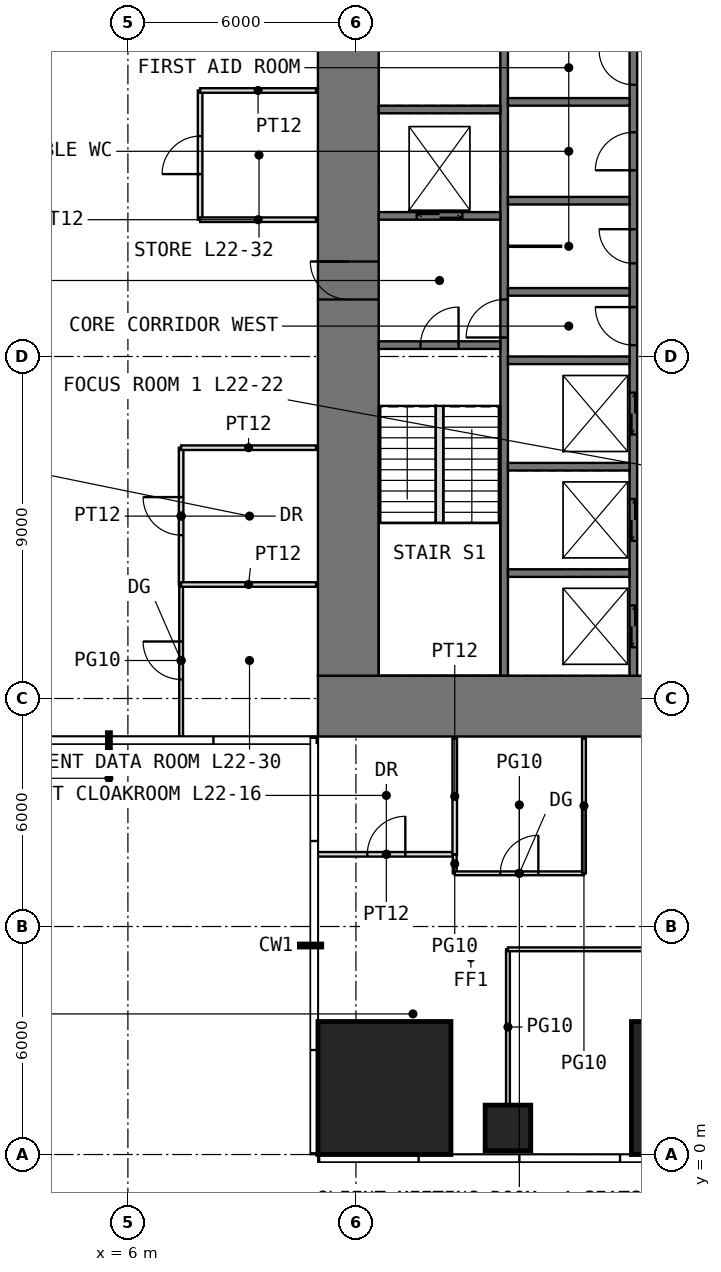
"""IFC4 building model, lengths in metres.
Left out: names, types, materials, properties, quantities, classifications, styles, units other than length and angle.
Written with IfcOpenShell. Run it as: python <this file> out.ifc"""

import sys

from ifc_helpers import new_model, si_unit, direction, frame, frame_2d, origin, origin_2d, place, context, subcontext, project, spatial, rectangle, extrude, element, fill, save


model = new_model("IFC4")
c1 = context("Model", 3, precision=1e-05, world=origin(), true_north=direction((0.0, 1.0)))
c2 = subcontext(c1, "Body", "Model", "MODEL_VIEW")
j1 = project(units=[si_unit("LENGTHUNIT", "METRE"), si_unit("PLANEANGLEUNIT", "RADIAN")], contexts=[c1])
p1 = place(None, origin())
s1 = spatial("IfcSite", under=j1, at=p1, CompositionType="ELEMENT")
p2 = place(p1, origin())
s2 = spatial("IfcBuilding", under=s1, at=p2, CompositionType="ELEMENT")
p3 = place(p2, frame((0.0, 0.0, 96.5)))
s3 = spatial("IfcBuildingStorey", under=s2, at=p3, CompositionType="ELEMENT", Elevation=96.5)
p4 = place(p3, frame((12.75, 1.75, 0.0), z_axis=(0.0, 0.0, 1.0), x_axis=(1.0, 0.0, 0.0)))
e1 = element("IfcColumn", 1, at=p4, inside=s3, PredefinedType="COLUMN", context=c2, shape_type="SweptSolid", body=[
    extrude(rectangle(XDim=3.5, YDim=3.5, at=origin_2d()), origin(), (0.0, 0.0, 1.0), 4.0),
])
p5 = place(p3, frame((16.0, 0.7, 0.0), z_axis=(0.0, 0.0, 1.0), x_axis=(1.0, 0.0, 0.0)))
e2 = element("IfcColumn", 2, at=p5, inside=s3, PredefinedType="COLUMN", context=c2, shape_type="SweptSolid", body=[
    extrude(rectangle(XDim=1.2, YDim=1.2, at=origin_2d()), origin(), (0.0, 0.0, 1.0), 4.0),
])
p6 = place(p3, frame((21.0, 1.75, 0.0), z_axis=(0.0, 0.0, 1.0), x_axis=(1.0, 0.0, 0.0)))
e3 = element("IfcColumn", 3, at=p6, inside=s3, PredefinedType="COLUMN", context=c2, shape_type="SweptSolid", body=[
    extrude(rectangle(XDim=3.5, YDim=3.5, at=origin_2d()), origin(), (0.0, 0.0, 1.0), 4.0),
])
p7 = place(p3, frame((11.0, 11.8, -0.05), z_axis=(0.0, 0.0, 1.0), x_axis=(1.0, 0.0, 0.0)))
e4 = element("IfcWall", 4, at=p7, inside=s3, PredefinedType="SHEAR", context=c2, shape_type="SweptSolid", body=[
    extrude(rectangle(XDim=20.0, YDim=1.6, at=frame_2d((10.0, 0.0))), origin(), (0.0, 0.0, 1.0), 4.0),
])
p8 = place(p7, frame((9.0, 0.0, 0.05)))
e5 = element("IfcOpeningElement", 5, at=p8, cuts=e4, PredefinedType="OPENING", context=c2, shape_type="SweptSolid", body=[
    extrude(rectangle(XDim=2.0, YDim=2.2, at=frame_2d((1.0, 1.1))), frame((0.0, 0.81, 0.0), z_axis=(0.0, -1.0, 0.0), x_axis=(1.0, 0.0, 0.0)), (0.0, 0.0, 1.0), 1.62),
])
p9 = place(p3, frame((11.8, 12.6, -0.05), z_axis=(0.0, 0.0, 1.0), x_axis=(0.0, 1.0, 0.0)))
e6 = element("IfcWall", 6, at=p9, inside=s3, PredefinedType="SHEAR", context=c2, shape_type="SweptSolid", body=[
    extrude(rectangle(XDim=16.8, YDim=1.6, at=frame_2d((8.4, 0.0))), origin(), (0.0, 0.0, 1.0), 4.0),
])
p10 = place(p9, frame((9.9, 0.0, 0.05)))
e7 = element("IfcOpeningElement", 7, at=p10, cuts=e6, PredefinedType="OPENING", context=c2, shape_type="SweptSolid", body=[
    extrude(rectangle(XDim=1.0, YDim=2.2, at=frame_2d((0.5, 1.1))), frame((0.0, 0.81, 0.0), z_axis=(0.0, -1.0, 0.0), x_axis=(1.0, 0.0, 0.0)), (0.0, 0.0, 1.0), 1.62),
])
p11 = place(p3, frame((15.9, 12.6, -0.05), z_axis=(0.0, 0.0, 1.0), x_axis=(0.0, 1.0, 0.0)))
e8 = element("IfcWall", 8, at=p11, inside=s3, PredefinedType="SHEAR", context=c2, shape_type="SweptSolid", body=[
    extrude(rectangle(XDim=16.8, YDim=0.2, at=frame_2d((8.4, 0.0))), origin(), (0.0, 0.0, 1.0), 4.0),
])
p12 = place(p11, frame((8.9, 0.0, 0.05)))
e9 = element("IfcOpeningElement", 9, at=p12, cuts=e8, PredefinedType="OPENING", context=c2, shape_type="SweptSolid", body=[
    extrude(rectangle(XDim=1.0, YDim=2.2, at=frame_2d((0.5, 1.1))), frame((0.0, 0.11, 0.0), z_axis=(0.0, -1.0, 0.0), x_axis=(1.0, 0.0, 0.0)), (0.0, 0.0, 1.0), 0.22),
])
p13 = place(p3, frame((19.3, 12.6, -0.05), z_axis=(0.0, 0.0, 1.0), x_axis=(0.0, 1.0, 0.0)))
e10 = element("IfcWall", 10, at=p13, inside=s3, PredefinedType="SHEAR", context=c2, shape_type="SweptSolid", body=[
    extrude(rectangle(XDim=16.8, YDim=0.2, at=frame_2d((8.4, 0.0))), origin(), (0.0, 0.0, 1.0), 4.0),
])
p14 = place(p13, frame((8.7, 0.0, 0.05)))
e11 = element("IfcOpeningElement", 11, at=p14, cuts=e10, PredefinedType="OPENING", context=c2, shape_type="SweptSolid", body=[
    extrude(rectangle(XDim=1.0, YDim=2.2, at=frame_2d((0.5, 1.1))), frame((0.0, 0.11, 0.0), z_axis=(0.0, -1.0, 0.0), x_axis=(1.0, 0.0, 0.0)), (0.0, 0.0, 1.0), 0.22),
])
p15 = place(p13, frame((10.85, 0.0, 0.05)))
e12 = element("IfcOpeningElement", 12, at=p15, cuts=e10, PredefinedType="OPENING", context=c2, shape_type="SweptSolid", body=[
    extrude(rectangle(XDim=0.9, YDim=2.2, at=frame_2d((0.45, 1.1))), frame((0.0, 0.11, 0.0), z_axis=(0.0, -1.0, 0.0), x_axis=(1.0, 0.0, 0.0)), (0.0, 0.0, 1.0), 0.22),
])
p16 = place(p13, frame((13.3, 0.0, 0.05)))
e13 = element("IfcOpeningElement", 13, at=p16, cuts=e10, PredefinedType="OPENING", context=c2, shape_type="SweptSolid", body=[
    extrude(rectangle(XDim=1.0, YDim=2.2, at=frame_2d((0.5, 1.1))), frame((0.0, 0.11, 0.0), z_axis=(0.0, -1.0, 0.0), x_axis=(1.0, 0.0, 0.0)), (0.0, 0.0, 1.0), 0.22),
])
p17 = place(p13, frame((15.55, 0.0, 0.05)))
e14 = element("IfcOpeningElement", 14, at=p17, cuts=e10, PredefinedType="OPENING", context=c2, shape_type="SweptSolid", body=[
    extrude(rectangle(XDim=0.9, YDim=2.2, at=frame_2d((0.45, 1.1))), frame((0.0, 0.11, 0.0), z_axis=(0.0, -1.0, 0.0), x_axis=(1.0, 0.0, 0.0)), (0.0, 0.0, 1.0), 0.22),
])
p18 = place(p13, frame((0.75, 0.0, 0.05)))
e15 = element("IfcOpeningElement", 15, at=p18, cuts=e10, PredefinedType="OPENING", context=c2, shape_type="SweptSolid", body=[
    extrude(rectangle(XDim=1.1, YDim=2.2, at=frame_2d((0.55, 1.1))), frame((0.0, 0.11, 0.0), z_axis=(0.0, -1.0, 0.0), x_axis=(1.0, 0.0, 0.0)), (0.0, 0.0, 1.0), 0.22),
])
p19 = place(p13, frame((3.55, 0.0, 0.05)))
e16 = element("IfcOpeningElement", 16, at=p19, cuts=e10, PredefinedType="OPENING", context=c2, shape_type="SweptSolid", body=[
    extrude(rectangle(XDim=1.1, YDim=2.2, at=frame_2d((0.55, 1.1))), frame((0.0, 0.11, 0.0), z_axis=(0.0, -1.0, 0.0), x_axis=(1.0, 0.0, 0.0)), (0.0, 0.0, 1.0), 0.22),
])
p20 = place(p13, frame((6.35, 0.0, 0.05)))
e17 = element("IfcOpeningElement", 17, at=p20, cuts=e10, PredefinedType="OPENING", context=c2, shape_type="SweptSolid", body=[
    extrude(rectangle(XDim=1.1, YDim=2.2, at=frame_2d((0.55, 1.1))), frame((0.0, 0.11, 0.0), z_axis=(0.0, -1.0, 0.0), x_axis=(1.0, 0.0, 0.0)), (0.0, 0.0, 1.0), 0.22),
])
p21 = place(p3, frame((12.6, 21.3, -0.05), z_axis=(0.0, 0.0, 1.0), x_axis=(1.0, 0.0, 0.0)))
e18 = element("IfcWall", 18, at=p21, inside=s3, PredefinedType="SHEAR", context=c2, shape_type="SweptSolid", body=[
    extrude(rectangle(XDim=3.2, YDim=0.2, at=frame_2d((1.6, 0.0))), origin(), (0.0, 0.0, 1.0), 4.0),
])
p22 = place(p21, frame((1.1, 0.0, 0.05)))
e19 = element("IfcOpeningElement", 19, at=p22, cuts=e18, PredefinedType="OPENING", context=c2, shape_type="SweptSolid", body=[
    extrude(rectangle(XDim=1.0, YDim=2.2, at=frame_2d((0.5, 1.1))), frame((0.0, 0.11, 0.0), z_axis=(0.0, -1.0, 0.0), x_axis=(1.0, 0.0, 0.0)), (0.0, 0.0, 1.0), 0.22),
])
p23 = place(p3, frame((12.6, 24.7, -0.05), z_axis=(0.0, 0.0, 1.0), x_axis=(1.0, 0.0, 0.0)))
e20 = element("IfcWall", 20, at=p23, inside=s3, PredefinedType="SHEAR", context=c2, shape_type="SweptSolid", body=[
    extrude(rectangle(XDim=3.2, YDim=0.2, at=frame_2d((1.6, 0.0))), origin(), (0.0, 0.0, 1.0), 4.0),
])
p24 = place(p23, frame((1.0, 0.0, 0.05)))
e21 = element("IfcOpeningElement", 21, at=p24, cuts=e20, PredefinedType="OPENING", context=c2, shape_type="SweptSolid", body=[
    extrude(rectangle(XDim=1.2, YDim=2.2, at=frame_2d((0.6, 1.1))), frame((0.0, 0.11, 0.0), z_axis=(0.0, -1.0, 0.0), x_axis=(1.0, 0.0, 0.0)), (0.0, 0.0, 1.0), 0.22),
])
for number, where, z_axis, x_axis in (
    (22, (12.6, 27.5, -0.05), (0.0, 0.0, 1.0), (1.0, 0.0, 0.0)),
    (23, (16.0, 15.3, -0.05), (0.0, 0.0, 1.0), (1.0, 0.0, 0.0)),
    (24, (16.0, 18.1, -0.05), (0.0, 0.0, 1.0), (1.0, 0.0, 0.0)),
    (25, (16.0, 20.9, -0.05), (0.0, 0.0, 1.0), (1.0, 0.0, 0.0)),
    (26, (16.0, 22.7, -0.05), (0.0, 0.0, 1.0), (1.0, 0.0, 0.0)),
    (27, (16.0, 25.1, -0.05), (0.0, 0.0, 1.0), (1.0, 0.0, 0.0)),
    (28, (16.0, 27.7, -0.05), (0.0, 0.0, 1.0), (1.0, 0.0, 0.0)),
):
    element("IfcWall", number, at=place(p3, frame(where, z_axis=z_axis, x_axis=x_axis)), inside=s3, PredefinedType="SHEAR", context=c2, shape_type="SweptSolid", body=[
        extrude(rectangle(XDim=3.2, YDim=0.2, at=frame_2d((1.6, 0.0))), origin(), (0.0, 0.0, 1.0), 4.0),
    ])
p25 = place(p3, frame((16.0, 23.9, 0.0), z_axis=(0.0, 0.0, 1.0), x_axis=(1.0, 0.0, 0.0)))
e29 = element("IfcWall", 29, at=p25, inside=s3, PredefinedType="PARTITIONING", context=c2, shape_type="SweptSolid", body=[
    extrude(rectangle(XDim=1.4, YDim=0.03, at=frame_2d((0.7, 0.0))), origin(), (0.0, 0.0, 1.0), 3.75),
])
p26 = place(p3, frame((7.4, 11.0, 0.0), z_axis=(0.0, 0.0, 1.0), x_axis=(0.0, 1.0, 0.0)))
e30 = element("IfcWall", 30, at=p26, inside=s3, PredefinedType="PARTITIONING", context=c2, shape_type="SweptSolid", body=[
    extrude(rectangle(XDim=4.0, YDim=0.1, at=frame_2d((2.0, 0.0))), origin(), (0.0, 0.0, 1.0), 3.75),
])
p27 = place(p26, frame((1.5, 0.0, 0.0)))
e31 = element("IfcOpeningElement", 31, at=p27, cuts=e30, PredefinedType="OPENING", context=c2, shape_type="SweptSolid", body=[
    extrude(rectangle(XDim=1.0, YDim=2.4, at=frame_2d((0.5, 1.2))), frame((0.0, 0.06, 0.0), z_axis=(0.0, -1.0, 0.0), x_axis=(1.0, 0.0, 0.0)), (0.0, 0.0, 1.0), 0.12),
])
p28 = place(p3, frame((7.4, 15.0, 0.0), z_axis=(0.0, 0.0, 1.0), x_axis=(0.0, 1.0, 0.0)))
e32 = element("IfcWall", 32, at=p28, inside=s3, PredefinedType="PARTITIONING", context=c2, shape_type="SweptSolid", body=[
    extrude(rectangle(XDim=3.6, YDim=0.12, at=frame_2d((1.8, 0.0))), origin(), (0.0, 0.0, 1.0), 3.75),
])
p29 = place(p28, frame((1.3, 0.0, 0.0)))
e33 = element("IfcOpeningElement", 33, at=p29, cuts=e32, PredefinedType="OPENING", context=c2, shape_type="SweptSolid", body=[
    extrude(rectangle(XDim=1.0, YDim=2.2, at=frame_2d((0.5, 1.1))), frame((0.0, 0.07, 0.0), z_axis=(0.0, -1.0, 0.0), x_axis=(1.0, 0.0, 0.0)), (0.0, 0.0, 1.0), 0.14),
])
for number, where, z_axis, x_axis in (
    (34, (7.4, 15.0, 0.0), (0.0, 0.0, 1.0), (1.0, 0.0, 0.0)),
    (35, (7.4, 18.6, 0.0), (0.0, 0.0, 1.0), (1.0, 0.0, 0.0)),
):
    element("IfcWall", number, at=place(p3, frame(where, z_axis=z_axis, x_axis=x_axis)), inside=s3, PredefinedType="PARTITIONING", context=c2, shape_type="SweptSolid", body=[
        extrude(rectangle(XDim=3.55, YDim=0.12, at=frame_2d((1.775, 0.0))), origin(), (0.0, 0.0, 1.0), 3.75),
    ])
p30 = place(p3, frame((7.9, 24.6, 0.0), z_axis=(0.0, 0.0, 1.0), x_axis=(0.0, 1.0, 0.0)))
e36 = element("IfcWall", 36, at=p30, inside=s3, PredefinedType="PARTITIONING", context=c2, shape_type="SweptSolid", body=[
    extrude(rectangle(XDim=3.4, YDim=0.12, at=frame_2d((1.7, 0.0))), origin(), (0.0, 0.0, 1.0), 3.75),
])
p31 = place(p30, frame((1.2, 0.0, 0.0)))
e37 = element("IfcOpeningElement", 37, at=p31, cuts=e36, PredefinedType="OPENING", context=c2, shape_type="SweptSolid", body=[
    extrude(rectangle(XDim=1.0, YDim=2.2, at=frame_2d((0.5, 1.1))), frame((0.0, 0.07, 0.0), z_axis=(0.0, -1.0, 0.0), x_axis=(1.0, 0.0, 0.0)), (0.0, 0.0, 1.0), 0.14),
])
for number, where, z_axis, x_axis in (
    (38, (7.9, 24.6, 0.0), (0.0, 0.0, 1.0), (1.0, 0.0, 0.0)),
    (39, (7.9, 28.0, 0.0), (0.0, 0.0, 1.0), (1.0, 0.0, 0.0)),
):
    element("IfcWall", number, at=place(p3, frame(where, z_axis=z_axis, x_axis=x_axis)), inside=s3, PredefinedType="PARTITIONING", context=c2, shape_type="SweptSolid", body=[
        extrude(rectangle(XDim=3.05, YDim=0.12, at=frame_2d((1.525, 0.0))), origin(), (0.0, 0.0, 1.0), 3.75),
    ])
p32 = place(p3, frame((11.0, 7.9, 0.0), z_axis=(0.0, 0.0, 1.0), x_axis=(1.0, 0.0, 0.0)))
e40 = element("IfcWall", 40, at=p32, inside=s3, PredefinedType="PARTITIONING", context=c2, shape_type="SweptSolid", body=[
    extrude(rectangle(XDim=3.6, YDim=0.12, at=frame_2d((1.8, 0.0))), origin(), (0.0, 0.0, 1.0), 3.75),
])
p33 = place(p32, frame((1.3, 0.0, 0.0)))
e41 = element("IfcOpeningElement", 41, at=p33, cuts=e40, PredefinedType="OPENING", context=c2, shape_type="SweptSolid", body=[
    extrude(rectangle(XDim=1.0, YDim=2.2, at=frame_2d((0.5, 1.1))), frame((0.0, 0.07, 0.0), z_axis=(0.0, -1.0, 0.0), x_axis=(1.0, 0.0, 0.0)), (0.0, 0.0, 1.0), 0.14),
])
p34 = place(p3, frame((14.6, 7.4, 0.0), z_axis=(0.0, 0.0, 1.0), x_axis=(0.0, 1.0, 0.0)))
e42 = element("IfcWall", 42, at=p34, inside=s3, PredefinedType="PARTITIONING", context=c2, shape_type="SweptSolid", body=[
    extrude(rectangle(XDim=0.5, YDim=0.1, at=frame_2d((0.25, 0.0))), origin(), (0.0, 0.0, 1.0), 3.75),
])
p35 = place(p3, frame((14.6, 7.4, 0.0), z_axis=(0.0, 0.0, 1.0), x_axis=(1.0, 0.0, 0.0)))
e43 = element("IfcWall", 43, at=p35, inside=s3, PredefinedType="PARTITIONING", context=c2, shape_type="SweptSolid", body=[
    extrude(rectangle(XDim=3.4, YDim=0.1, at=frame_2d((1.7, 0.0))), origin(), (0.0, 0.0, 1.0), 3.75),
])
p36 = place(p35, frame((1.2, 0.0, 0.0)))
e44 = element("IfcOpeningElement", 44, at=p36, cuts=e43, PredefinedType="OPENING", context=c2, shape_type="SweptSolid", body=[
    extrude(rectangle(XDim=1.0, YDim=2.4, at=frame_2d((0.5, 1.2))), frame((0.0, 0.06, 0.0), z_axis=(0.0, -1.0, 0.0), x_axis=(1.0, 0.0, 0.0)), (0.0, 0.0, 1.0), 0.12),
])
p37 = place(p3, frame((14.6, 7.9, 0.0), z_axis=(0.0, 0.0, 1.0), x_axis=(0.0, 1.0, 0.0)))
e45 = element("IfcWall", 45, at=p37, inside=s3, PredefinedType="PARTITIONING", context=c2, shape_type="SweptSolid", body=[
    extrude(rectangle(XDim=3.05, YDim=0.12, at=frame_2d((1.525, 0.0))), origin(), (0.0, 0.0, 1.0), 3.75),
])
p38 = place(p3, frame((16.0, 1.31, 0.0), z_axis=(0.0, 0.0, 1.0), x_axis=(0.0, 1.0, 0.0)))
e46 = element("IfcWall", 46, at=p38, inside=s3, PredefinedType="PARTITIONING", context=c2, shape_type="SweptSolid", body=[
    extrude(rectangle(XDim=4.09, YDim=0.1, at=frame_2d((2.045, 0.0))), origin(), (0.0, 0.0, 1.0), 3.75),
])
p39 = place(p3, frame((16.0, 5.4, 0.0), z_axis=(0.0, 0.0, 1.0), x_axis=(1.0, 0.0, 0.0)))
e47 = element("IfcWall", 47, at=p39, inside=s3, PredefinedType="PARTITIONING", context=c2, shape_type="SweptSolid", body=[
    extrude(rectangle(XDim=10.0, YDim=0.1, at=frame_2d((5.0, 0.0))), origin(), (0.0, 0.0, 1.0), 3.75),
])
p40 = place(p39, frame((4.1, 0.0, 0.0)))
e48 = element("IfcOpeningElement", 48, at=p40, cuts=e47, PredefinedType="OPENING", context=c2, shape_type="SweptSolid", body=[
    extrude(rectangle(XDim=1.8, YDim=2.4, at=frame_2d((0.9, 1.2))), frame((0.0, 0.06, 0.0), z_axis=(0.0, -1.0, 0.0), x_axis=(1.0, 0.0, 0.0)), (0.0, 0.0, 1.0), 0.12),
])
p41 = place(p3, frame((18.0, 7.4, 0.0), z_axis=(0.0, 0.0, 1.0), x_axis=(0.0, 1.0, 0.0)))
e49 = element("IfcWall", 49, at=p41, inside=s3, PredefinedType="PARTITIONING", context=c2, shape_type="SweptSolid", body=[
    extrude(rectangle(XDim=3.55, YDim=0.1, at=frame_2d((1.775, 0.0))), origin(), (0.0, 0.0, 1.0), 3.75),
])
p42 = place(p3, frame((14.2, 16.62, 0.0), z_axis=(0.0, 0.0, 1.0), x_axis=(0.0, 1.0, 0.0)))
e50 = element("IfcWall", 50, at=p42, inside=s3, PredefinedType="PARTITIONING", context=c2, shape_type="SweptSolid", body=[
    extrude(rectangle(XDim=3.08, YDim=0.2, at=frame_2d((1.54, 0.0))), origin(), (0.0, 0.0, 1.0), 4.0),
])
p43 = place(p10, origin())
e51 = element("IfcDoor", 51, at=p43, inside=s3, OperationType="SINGLE_SWING_RIGHT", PredefinedType="DOOR", context=c2, shape_type="SweptSolid", body=[
    extrude(rectangle(XDim=1.0, YDim=2.2, at=frame_2d((0.5, 1.1))), frame((0.0, 0.025, 0.0), z_axis=(0.0, -1.0, 0.0), x_axis=(1.0, 0.0, 0.0)), (0.0, 0.0, 1.0), 0.05),
])
fill(e7, e51)
p44 = place(p22, origin())
e52 = element("IfcDoor", 52, at=p44, inside=s3, OperationType="SINGLE_SWING_RIGHT", PredefinedType="DOOR", context=c2, shape_type="SweptSolid", body=[
    extrude(rectangle(XDim=1.0, YDim=2.2, at=frame_2d((0.5, 1.1))), frame((0.0, 0.025, 0.0), z_axis=(0.0, -1.0, 0.0), x_axis=(1.0, 0.0, 0.0)), (0.0, 0.0, 1.0), 0.05),
])
fill(e19, e52)
p45 = place(p12, origin())
e53 = element("IfcDoor", 53, at=p45, inside=s3, OperationType="SINGLE_SWING_LEFT", PredefinedType="DOOR", context=c2, shape_type="SweptSolid", body=[
    extrude(rectangle(XDim=1.0, YDim=2.2, at=frame_2d((0.5, 1.1))), frame((0.0, 0.025, 0.0), z_axis=(0.0, -1.0, 0.0), x_axis=(1.0, 0.0, 0.0)), (0.0, 0.0, 1.0), 0.05),
])
fill(e9, e53)
p46 = place(p14, origin())
e54 = element("IfcDoor", 54, at=p46, inside=s3, OperationType="SINGLE_SWING_RIGHT", PredefinedType="DOOR", context=c2, shape_type="SweptSolid", body=[
    extrude(rectangle(XDim=1.0, YDim=2.2, at=frame_2d((0.5, 1.1))), frame((0.0, 0.025, 0.0), z_axis=(0.0, -1.0, 0.0), x_axis=(1.0, 0.0, 0.0)), (0.0, 0.0, 1.0), 0.05),
])
fill(e11, e54)
p47 = place(p15, origin())
e55 = element("IfcDoor", 55, at=p47, inside=s3, OperationType="SINGLE_SWING_RIGHT", PredefinedType="DOOR", context=c2, shape_type="SweptSolid", body=[
    extrude(rectangle(XDim=0.9, YDim=2.2, at=frame_2d((0.45, 1.1))), frame((0.0, 0.025, 0.0), z_axis=(0.0, -1.0, 0.0), x_axis=(1.0, 0.0, 0.0)), (0.0, 0.0, 1.0), 0.05),
])
fill(e12, e55)
p48 = place(p16, origin())
e56 = element("IfcDoor", 56, at=p48, inside=s3, OperationType="SINGLE_SWING_LEFT", PredefinedType="DOOR", context=c2, shape_type="SweptSolid", body=[
    extrude(rectangle(XDim=1.0, YDim=2.2, at=frame_2d((0.5, 1.1))), frame((0.0, 0.025, 0.0), z_axis=(0.0, -1.0, 0.0), x_axis=(1.0, 0.0, 0.0)), (0.0, 0.0, 1.0), 0.05),
])
fill(e13, e56)
p49 = place(p17, origin())
e57 = element("IfcDoor", 57, at=p49, inside=s3, OperationType="SINGLE_SWING_RIGHT", PredefinedType="DOOR", context=c2, shape_type="SweptSolid", body=[
    extrude(rectangle(XDim=0.9, YDim=2.2, at=frame_2d((0.45, 1.1))), frame((0.0, 0.025, 0.0), z_axis=(0.0, -1.0, 0.0), x_axis=(1.0, 0.0, 0.0)), (0.0, 0.0, 1.0), 0.05),
])
fill(e14, e57)
p50 = place(p33, origin())
e58 = element("IfcDoor", 58, at=p50, inside=s3, OperationType="SINGLE_SWING_RIGHT", PredefinedType="DOOR", context=c2, shape_type="SweptSolid", body=[
    extrude(rectangle(XDim=1.0, YDim=2.2, at=frame_2d((0.5, 1.1))), frame((0.0, 0.025, 0.0), z_axis=(0.0, -1.0, 0.0), x_axis=(1.0, 0.0, 0.0)), (0.0, 0.0, 1.0), 0.05),
])
fill(e41, e58)
p51 = place(p36, origin())
e59 = element("IfcDoor", 59, at=p51, inside=s3, OperationType="SINGLE_SWING_RIGHT", PredefinedType="DOOR", context=c2, shape_type="SweptSolid", body=[
    extrude(rectangle(XDim=1.0, YDim=2.4, at=frame_2d((0.5, 1.2))), frame((0.0, 0.025, 0.0), z_axis=(0.0, -1.0, 0.0), x_axis=(1.0, 0.0, 0.0)), (0.0, 0.0, 1.0), 0.05),
])
fill(e44, e59)
p52 = place(p27, origin())
e60 = element("IfcDoor", 60, at=p52, inside=s3, OperationType="SINGLE_SWING_RIGHT", PredefinedType="DOOR", context=c2, shape_type="SweptSolid", body=[
    extrude(rectangle(XDim=1.0, YDim=2.4, at=frame_2d((0.5, 1.2))), frame((0.0, 0.025, 0.0), z_axis=(0.0, -1.0, 0.0), x_axis=(1.0, 0.0, 0.0)), (0.0, 0.0, 1.0), 0.05),
])
fill(e31, e60)
p53 = place(p29, origin())
e61 = element("IfcDoor", 61, at=p53, inside=s3, OperationType="SINGLE_SWING_RIGHT", PredefinedType="DOOR", context=c2, shape_type="SweptSolid", body=[
    extrude(rectangle(XDim=1.0, YDim=2.2, at=frame_2d((0.5, 1.1))), frame((0.0, 0.025, 0.0), z_axis=(0.0, -1.0, 0.0), x_axis=(1.0, 0.0, 0.0)), (0.0, 0.0, 1.0), 0.05),
])
fill(e33, e61)
p54 = place(p31, origin())
e62 = element("IfcDoor", 62, at=p54, inside=s3, OperationType="SINGLE_SWING_LEFT", PredefinedType="DOOR", context=c2, shape_type="SweptSolid", body=[
    extrude(rectangle(XDim=1.0, YDim=2.2, at=frame_2d((0.5, 1.1))), frame((0.0, 0.025, 0.0), z_axis=(0.0, -1.0, 0.0), x_axis=(1.0, 0.0, 0.0)), (0.0, 0.0, 1.0), 0.05),
])
fill(e37, e62)
p55 = place(p18, origin())
e63 = element("IfcDoor", 63, at=p55, inside=s3, OperationType="DOUBLE_DOOR_SLIDING", PredefinedType="DOOR", context=c2, shape_type="SweptSolid", body=[
    extrude(rectangle(XDim=1.1, YDim=2.2, at=frame_2d((0.55, 1.1))), frame((0.0, 0.025, 0.0), z_axis=(0.0, -1.0, 0.0), x_axis=(1.0, 0.0, 0.0)), (0.0, 0.0, 1.0), 0.05),
])
fill(e15, e63)
p56 = place(p19, origin())
e64 = element("IfcDoor", 64, at=p56, inside=s3, OperationType="DOUBLE_DOOR_SLIDING", PredefinedType="DOOR", context=c2, shape_type="SweptSolid", body=[
    extrude(rectangle(XDim=1.1, YDim=2.2, at=frame_2d((0.55, 1.1))), frame((0.0, 0.025, 0.0), z_axis=(0.0, -1.0, 0.0), x_axis=(1.0, 0.0, 0.0)), (0.0, 0.0, 1.0), 0.05),
])
fill(e16, e64)
p57 = place(p20, origin())
e65 = element("IfcDoor", 65, at=p57, inside=s3, OperationType="DOUBLE_DOOR_SLIDING", PredefinedType="DOOR", context=c2, shape_type="SweptSolid", body=[
    extrude(rectangle(XDim=1.1, YDim=2.2, at=frame_2d((0.55, 1.1))), frame((0.0, 0.025, 0.0), z_axis=(0.0, -1.0, 0.0), x_axis=(1.0, 0.0, 0.0)), (0.0, 0.0, 1.0), 0.05),
])
fill(e17, e65)
p58 = place(p24, origin())
e66 = element("IfcDoor", 66, at=p58, inside=s3, OperationType="DOUBLE_DOOR_SLIDING", PredefinedType="DOOR", context=c2, shape_type="SweptSolid", body=[
    extrude(rectangle(XDim=1.2, YDim=2.2, at=frame_2d((0.6, 1.1))), frame((0.0, 0.025, 0.0), z_axis=(0.0, -1.0, 0.0), x_axis=(1.0, 0.0, 0.0)), (0.0, 0.0, 1.0), 0.05),
])
fill(e21, e66)
save(model, sys.argv[1])
